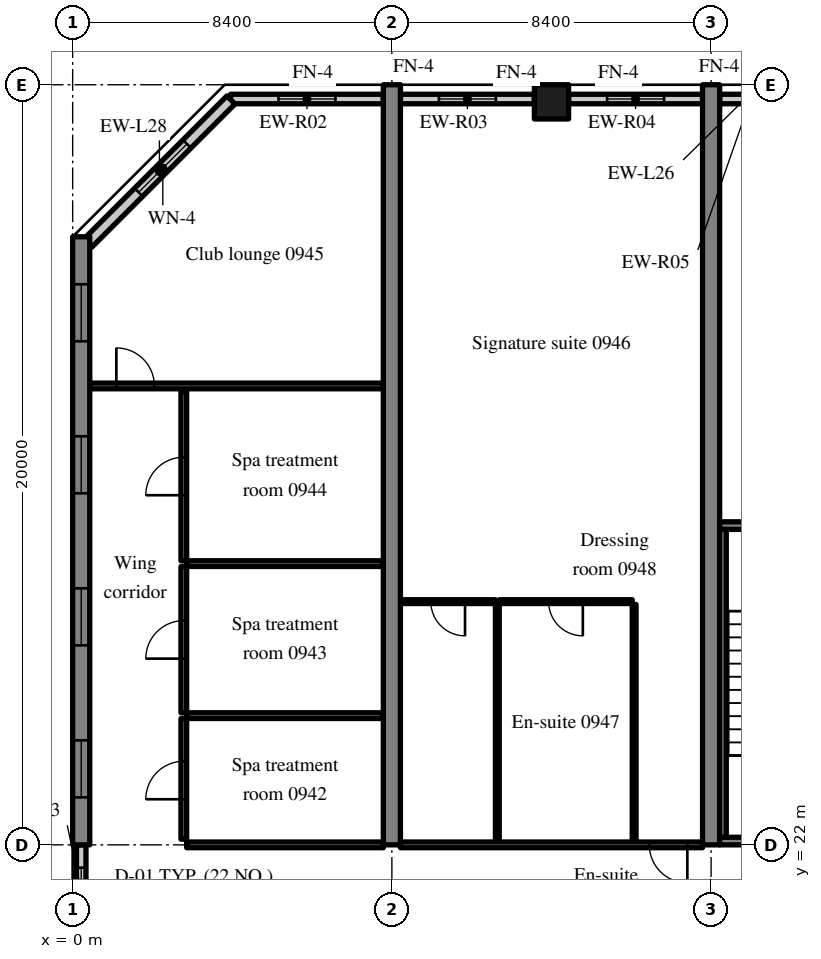
"""IFC4 building model, lengths in metres.
Left out: names, types, materials, properties, quantities, classifications, styles, units other than length and angle.
Written with IfcOpenShell. Run it as: python <this file> out.ifc"""

import sys

from ifc_helpers import new_model, si_unit, direction, frame, frame_2d, origin, origin_2d, place, context, subcontext, project, spatial, rectangle, extrude, source, transform, mapped, element, fill, save


model = new_model("IFC4")
c1 = context("Model", 3, precision=1e-05, world=origin(), true_north=direction((0.0, 1.0)))
c2 = subcontext(c1, "Body", "Model", "MODEL_VIEW")
j1 = project(units=[si_unit("LENGTHUNIT", "METRE"), si_unit("PLANEANGLEUNIT", "RADIAN")], contexts=[c1])
p1 = place(None, origin())
s1 = spatial("IfcSite", under=j1, at=p1, CompositionType="ELEMENT")
p2 = place(p1, origin())
s2 = spatial("IfcBuilding", under=s1, at=p2, CompositionType="ELEMENT")
p3 = place(p2, frame((0.0, 0.0, 43.0)))
s3 = spatial("IfcBuildingStorey", under=s2, at=p3, CompositionType="ELEMENT", Elevation=43.0)
m1 = source(origin(), c2, "Body", "SweptSolid", [
    extrude(rectangle(XDim=16.0, YDim=0.45, at=frame_2d((8.0, 0.0))), origin(), (0.0, 0.0, 1.0), 3.52),
])
p4 = place(p3, frame((0.225, 22.0, 0.0), z_axis=(0.0, 0.0, 1.0), x_axis=(0.0, 1.0, 0.0)))
e1 = element("IfcWall", 1, at=p4, inside=s3, PredefinedType="SHEAR", context=c2, shape_type="MappedRepresentation", body=[
    mapped(m1, transform((0.0, 0.0, 0.0), scale=1.0)),
])
m2 = source(origin(), c2, "Body", "SweptSolid", [
    extrude(rectangle(XDim=1.5, YDim=1.5, at=frame_2d((0.75, 0.75))), frame((0.0, 0.235, 0.0), z_axis=(0.0, -1.0, 0.0), x_axis=(1.0, 0.0, 0.0)), (0.0, 0.0, 1.0), 0.47),
])
p5 = place(p4, frame((1.25, 0.0, 0.9)))
e2 = element("IfcOpeningElement", 2, at=p5, cuts=e1, PredefinedType="OPENING", context=c2, shape_type="MappedRepresentation", body=[
    mapped(m2, transform((0.0, 0.0, 0.0), scale=1.0)),
])
p6 = place(p4, frame((5.25, 0.0, 0.9)))
e3 = element("IfcOpeningElement", 3, at=p6, cuts=e1, PredefinedType="OPENING", context=c2, shape_type="MappedRepresentation", body=[
    mapped(m2, transform((0.0, 0.0, 0.0), scale=1.0)),
])
p7 = place(p4, frame((9.25, 0.0, 0.9)))
e4 = element("IfcOpeningElement", 4, at=p7, cuts=e1, PredefinedType="OPENING", context=c2, shape_type="MappedRepresentation", body=[
    mapped(m2, transform((0.0, 0.0, 0.0), scale=1.0)),
])
p8 = place(p4, frame((13.25, 0.0, 0.9)))
e5 = element("IfcOpeningElement", 5, at=p8, cuts=e1, PredefinedType="OPENING", context=c2, shape_type="MappedRepresentation", body=[
    mapped(m2, transform((0.0, 0.0, 0.0), scale=1.0)),
])
m3 = source(origin(), c2, "Body", "SweptSolid", [
    extrude(rectangle(XDim=20.0, YDim=0.45, at=frame_2d((10.0, 0.0))), origin(), (0.0, 0.0, 1.0), 3.52),
])
for number, where, z_axis, x_axis in (
    (6, (8.4, 22.0, 0.0), (0.0, 0.0, 1.0), (0.0, 1.0, 0.0)),
    (7, (16.8, 22.0, 0.0), (0.0, 0.0, 1.0), (0.0, 1.0, 0.0)),
):
    element("IfcWall", number, at=place(p3, frame(where, z_axis=z_axis, x_axis=x_axis)), inside=s3, PredefinedType="SHEAR", context=c2, shape_type="MappedRepresentation", body=[
        mapped(m3, transform((0.0, 0.0, 0.0), scale=1.0)),
    ])
m4 = source(origin(), c2, "Body", "SweptSolid", [
    extrude(rectangle(XDim=0.9, YDim=0.9, at=origin_2d()), origin(), (0.0, 0.0, 1.0), 3.52),
])
p9 = place(p3, frame((12.6, 41.55, 0.0), z_axis=(0.0, 0.0, 1.0), x_axis=(1.0, 0.0, 0.0)))
e8 = element("IfcColumn", 8, at=p9, inside=s3, PredefinedType="COLUMN", context=c2, shape_type="MappedRepresentation", body=[
    mapped(m4, transform((0.0, 0.0, 0.0), scale=1.0)),
])
m5 = source(origin(), c2, "Body", "SweptSolid", [
    extrude(rectangle(XDim=4.02, YDim=0.25, at=frame_2d((2.01, 0.0))), origin(), (0.0, 0.0, 1.0), 2.82),
])
p10 = place(p3, frame((8.175, 41.625, 0.0), z_axis=(0.0, 0.0, 1.0), x_axis=(-1.0, 0.0, 0.0)))
e9 = element("IfcWall", 9, at=p10, inside=s3, PredefinedType="SOLIDWALL", context=c2, shape_type="MappedRepresentation", body=[
    mapped(m5, transform((0.0, 0.0, 0.0), scale=1.0)),
])
m6 = source(origin(), c2, "Body", "SweptSolid", [
    extrude(rectangle(XDim=1.5, YDim=1.5, at=frame_2d((0.75, 0.75))), frame((0.0, 0.135, 0.0), z_axis=(0.0, -1.0, 0.0), x_axis=(1.0, 0.0, 0.0)), (0.0, 0.0, 1.0), 0.27),
])
p11 = place(p10, frame((1.26, 0.0, 0.9)))
e10 = element("IfcOpeningElement", 10, at=p11, cuts=e9, PredefinedType="OPENING", context=c2, shape_type="MappedRepresentation", body=[
    mapped(m6, transform((0.0, 0.0, 0.0), scale=1.0)),
])
m7 = source(origin(), c2, "Body", "SweptSolid", [
    extrude(rectangle(XDim=3.525, YDim=0.25, at=frame_2d((1.762, 0.0))), origin(), (0.0, 0.0, 1.0), 2.82),
])
p12 = place(p3, frame((12.15, 41.625, 0.0), z_axis=(0.0, 0.0, 1.0), x_axis=(-1.0, 0.0, 0.0)))
e11 = element("IfcWall", 11, at=p12, inside=s3, PredefinedType="SOLIDWALL", context=c2, shape_type="MappedRepresentation", body=[
    mapped(m7, transform((0.0, 0.0, 0.0), scale=1.0)),
])
p13 = place(p12, frame((1.012, 0.0, 0.9)))
e12 = element("IfcOpeningElement", 12, at=p13, cuts=e11, PredefinedType="OPENING", context=c2, shape_type="MappedRepresentation", body=[
    mapped(m6, transform((0.0, 0.0, 0.0), scale=1.0)),
])
p14 = place(p3, frame((16.575, 41.625, 0.0), z_axis=(0.0, 0.0, 1.0), x_axis=(-1.0, 0.0, 0.0)))
e13 = element("IfcWall", 13, at=p14, inside=s3, PredefinedType="SOLIDWALL", context=c2, shape_type="MappedRepresentation", body=[
    mapped(m7, transform((0.0, 0.0, 0.0), scale=1.0)),
])
p15 = place(p14, frame((1.012, 0.0, 0.9)))
e14 = element("IfcOpeningElement", 14, at=p15, cuts=e13, PredefinedType="OPENING", context=c2, shape_type="MappedRepresentation", body=[
    mapped(m6, transform((0.0, 0.0, 0.0), scale=1.0)),
])
m8 = source(origin(), c2, "Body", "SweptSolid", [
    extrude(rectangle(XDim=1.633, YDim=0.25, at=frame_2d((0.816, 0.0))), origin(), (0.0, 0.0, 1.0), 2.82),
])
p16 = place(p3, frame((18.658, 41.625, 0.0), z_axis=(0.0, 0.0, 1.0), x_axis=(-1.0, 0.0, 0.0)))
e15 = element("IfcWall", 15, at=p16, inside=s3, PredefinedType="SOLIDWALL", context=c2, shape_type="MappedRepresentation", body=[
    mapped(m8, transform((0.0, 0.0, 0.0), scale=1.0)),
])
m9 = source(origin(), c2, "Body", "SweptSolid", [
    extrude(rectangle(XDim=5.326, YDim=0.3, at=frame_2d((2.663, 0.0))), origin(), (0.0, 0.0, 1.0), 3.52),
])
p17 = place(p3, frame((4.166, 41.6, 0.0), z_axis=(0.0, 0.0, 1.0), x_axis=(-0.707106781187, -0.707106781187, 0.0)))
e16 = element("IfcWall", 16, at=p17, inside=s3, PredefinedType="SOLIDWALL", context=c2, shape_type="MappedRepresentation", body=[
    mapped(m9, transform((0.0, 0.0, 0.0), scale=1.0)),
])
m10 = source(origin(), c2, "Body", "SweptSolid", [
    extrude(rectangle(XDim=1.8, YDim=1.5, at=frame_2d((0.9, 0.75))), frame((0.0, 0.16, 0.0), z_axis=(0.0, -1.0, 0.0), x_axis=(1.0, 0.0, 0.0)), (0.0, 0.0, 1.0), 0.32),
])
p18 = place(p17, frame((1.636, 0.0, 0.9)))
e17 = element("IfcOpeningElement", 17, at=p18, cuts=e16, PredefinedType="OPENING", context=c2, shape_type="MappedRepresentation", body=[
    mapped(m10, transform((0.0, 0.0, 0.0), scale=1.0)),
])
m11 = source(origin(), c2, "Body", "SweptSolid", [
    extrude(rectangle(XDim=2.4, YDim=0.25, at=frame_2d((1.2, 0.0))), origin(), (0.0, 0.0, 1.0), 2.62),
])
p19 = place(p3, frame((0.225, 19.6, 0.0), z_axis=(0.0, 0.0, 1.0), x_axis=(0.0, 1.0, 0.0)))
e18 = element("IfcWall", 18, at=p19, inside=s3, PredefinedType="SOLIDWALL", context=c2, shape_type="MappedRepresentation", body=[
    mapped(m11, transform((0.0, 0.0, 0.0), scale=1.0)),
])
m12 = source(origin(), c2, "Body", "SweptSolid", [
    extrude(rectangle(XDim=1.2, YDim=1.5, at=frame_2d((0.6, 0.75))), frame((0.0, 0.135, 0.0), z_axis=(0.0, -1.0, 0.0), x_axis=(1.0, 0.0, 0.0)), (0.0, 0.0, 1.0), 0.27),
])
p20 = place(p19, frame((0.6, 0.0, 0.9)))
e19 = element("IfcOpeningElement", 19, at=p20, cuts=e18, PredefinedType="OPENING", context=c2, shape_type="MappedRepresentation", body=[
    mapped(m12, transform((0.0, 0.0, 0.0), scale=1.0)),
])
m13 = source(origin(), c2, "Body", "SweptSolid", [
    extrude(rectangle(XDim=8.175, YDim=0.2, at=frame_2d((4.087, 0.0))), origin(), (0.0, 0.0, 1.0), 3.52),
])
p21 = place(p3, frame((17.025, 22.1, 0.0), z_axis=(0.0, 0.0, 1.0), x_axis=(1.0, 0.0, 0.0)))
e20 = element("IfcWall", 20, at=p21, inside=s3, PredefinedType="SOLIDWALL", context=c2, shape_type="MappedRepresentation", body=[
    mapped(m13, transform((0.0, 0.0, 0.0), scale=1.0)),
])
m14 = source(origin(), c2, "Body", "SweptSolid", [
    extrude(rectangle(XDim=1.2, YDim=2.1, at=frame_2d((0.6, 1.05))), frame((0.0, 0.11, 0.0), z_axis=(0.0, -1.0, 0.0), x_axis=(1.0, 0.0, 0.0)), (0.0, 0.0, 1.0), 0.22),
])
p22 = place(p21, frame((5.975, 0.0, 0.0)))
e21 = element("IfcOpeningElement", 21, at=p22, cuts=e20, PredefinedType="OPENING", context=c2, shape_type="MappedRepresentation", body=[
    mapped(m14, transform((0.0, 0.0, 0.0), scale=1.0)),
])
p23 = place(p3, frame((17.025, 30.4, 0.0), z_axis=(0.0, 0.0, 1.0), x_axis=(1.0, 0.0, 0.0)))
e22 = element("IfcWall", 22, at=p23, inside=s3, PredefinedType="SOLIDWALL", context=c2, shape_type="MappedRepresentation", body=[
    mapped(m13, transform((0.0, 0.0, 0.0), scale=1.0)),
])
m15 = source(origin(), c2, "Body", "SweptSolid", [
    extrude(rectangle(XDim=1.0, YDim=2.1, at=frame_2d((0.5, 1.05))), frame((0.0, 0.11, 0.0), z_axis=(0.0, -1.0, 0.0), x_axis=(1.0, 0.0, 0.0)), (0.0, 0.0, 1.0), 0.22),
])
p24 = place(p23, frame((6.075, 0.0, 0.0)))
e23 = element("IfcOpeningElement", 23, at=p24, cuts=e22, PredefinedType="OPENING", context=c2, shape_type="MappedRepresentation", body=[
    mapped(m15, transform((0.0, 0.0, 0.0), scale=1.0)),
])
m16 = source(origin(), c2, "Body", "SweptSolid", [
    extrude(rectangle(XDim=8.1, YDim=0.175, at=frame_2d((4.05, 0.0))), origin(), (0.0, 0.0, 1.0), 3.52),
])
p25 = place(p3, frame((17.112, 22.2, 0.0), z_axis=(0.0, 0.0, 1.0), x_axis=(0.0, 1.0, 0.0)))
e24 = element("IfcWall", 24, at=p25, inside=s3, PredefinedType="SOLIDWALL", context=c2, shape_type="MappedRepresentation", body=[
    mapped(m16, transform((0.0, 0.0, 0.0), scale=1.0)),
])
m17 = source(origin(), c2, "Body", "SweptSolid", [
    extrude(rectangle(XDim=5.175, YDim=0.15, at=frame_2d((2.587, 0.0))), origin(), (0.0, 0.0, 1.0), 2.82),
])
p26 = place(p3, frame((3.0, 22.0, 0.0), z_axis=(0.0, 0.0, 1.0), x_axis=(1.0, 0.0, 0.0)))
e25 = element("IfcWall", 25, at=p26, inside=s3, PredefinedType="PARTITIONING", context=c2, shape_type="MappedRepresentation", body=[
    mapped(m17, transform((0.0, 0.0, 0.0), scale=1.0)),
])
m18 = source(origin(), c2, "Body", "SweptSolid", [
    extrude(rectangle(XDim=3.175, YDim=0.15, at=frame_2d((1.587, 0.0))), origin(), (0.0, 0.0, 1.0), 3.52),
])
p27 = place(p3, frame((2.925, 22.15, 0.0), z_axis=(0.0, 0.0, 1.0), x_axis=(0.0, 1.0, 0.0)))
e26 = element("IfcWall", 26, at=p27, inside=s3, PredefinedType="PARTITIONING", context=c2, shape_type="MappedRepresentation", body=[
    mapped(m18, transform((0.0, 0.0, 0.0), scale=1.0)),
])
m19 = source(origin(), c2, "Body", "SweptSolid", [
    extrude(rectangle(XDim=1.0, YDim=2.1, at=frame_2d((0.5, 1.05))), frame((0.0, 0.085, 0.0), z_axis=(0.0, -1.0, 0.0), x_axis=(1.0, 0.0, 0.0)), (0.0, 0.0, 1.0), 0.17),
])
p28 = place(p27, frame((1.05, 0.0, 0.0)))
e27 = element("IfcOpeningElement", 27, at=p28, cuts=e26, PredefinedType="OPENING", context=c2, shape_type="MappedRepresentation", body=[
    mapped(m19, transform((0.0, 0.0, 0.0), scale=1.0)),
])
m20 = source(origin(), c2, "Body", "SweptSolid", [
    extrude(rectangle(XDim=5.175, YDim=0.15, at=frame_2d((2.587, 0.0))), origin(), (0.0, 0.0, 1.0), 3.52),
])
p29 = place(p3, frame((3.0, 25.4, 0.0), z_axis=(0.0, 0.0, 1.0), x_axis=(1.0, 0.0, 0.0)))
e28 = element("IfcWall", 28, at=p29, inside=s3, PredefinedType="PARTITIONING", context=c2, shape_type="MappedRepresentation", body=[
    mapped(m20, transform((0.0, 0.0, 0.0), scale=1.0)),
])
m21 = source(origin(), c2, "Body", "SweptSolid", [
    extrude(rectangle(XDim=3.85, YDim=0.15, at=frame_2d((1.925, 0.0))), origin(), (0.0, 0.0, 1.0), 3.52),
])
p30 = place(p3, frame((2.925, 25.475, 0.0), z_axis=(0.0, 0.0, 1.0), x_axis=(0.0, 1.0, 0.0)))
e29 = element("IfcWall", 29, at=p30, inside=s3, PredefinedType="PARTITIONING", context=c2, shape_type="MappedRepresentation", body=[
    mapped(m21, transform((0.0, 0.0, 0.0), scale=1.0)),
])
p31 = place(p30, frame((1.425, 0.0, 0.0)))
e30 = element("IfcOpeningElement", 30, at=p31, cuts=e29, PredefinedType="OPENING", context=c2, shape_type="MappedRepresentation", body=[
    mapped(m19, transform((0.0, 0.0, 0.0), scale=1.0)),
])
p32 = place(p3, frame((3.0, 29.4, 0.0), z_axis=(0.0, 0.0, 1.0), x_axis=(1.0, 0.0, 0.0)))
e31 = element("IfcWall", 31, at=p32, inside=s3, PredefinedType="PARTITIONING", context=c2, shape_type="MappedRepresentation", body=[
    mapped(m20, transform((0.0, 0.0, 0.0), scale=1.0)),
])
m22 = source(origin(), c2, "Body", "SweptSolid", [
    extrude(rectangle(XDim=4.45, YDim=0.15, at=frame_2d((2.225, 0.0))), origin(), (0.0, 0.0, 1.0), 3.52),
])
p33 = place(p3, frame((2.925, 29.475, 0.0), z_axis=(0.0, 0.0, 1.0), x_axis=(0.0, 1.0, 0.0)))
e32 = element("IfcWall", 32, at=p33, inside=s3, PredefinedType="PARTITIONING", context=c2, shape_type="MappedRepresentation", body=[
    mapped(m22, transform((0.0, 0.0, 0.0), scale=1.0)),
])
p34 = place(p33, frame((1.725, 0.0, 0.0)))
e33 = element("IfcOpeningElement", 33, at=p34, cuts=e32, PredefinedType="OPENING", context=c2, shape_type="MappedRepresentation", body=[
    mapped(m19, transform((0.0, 0.0, 0.0), scale=1.0)),
])
m23 = source(origin(), c2, "Body", "SweptSolid", [
    extrude(rectangle(XDim=7.725, YDim=0.15, at=frame_2d((3.863, 0.0))), origin(), (0.0, 0.0, 1.0), 3.52),
])
p35 = place(p3, frame((0.45, 34.075, 0.0), z_axis=(0.0, 0.0, 1.0), x_axis=(1.0, 0.0, 0.0)))
e34 = element("IfcWall", 34, at=p35, inside=s3, PredefinedType="PARTITIONING", context=c2, shape_type="MappedRepresentation", body=[
    mapped(m23, transform((0.0, 0.0, 0.0), scale=1.0)),
])
p36 = place(p35, frame((0.7, 0.0, 0.0)))
e35 = element("IfcOpeningElement", 35, at=p36, cuts=e34, PredefinedType="OPENING", context=c2, shape_type="MappedRepresentation", body=[
    mapped(m19, transform((0.0, 0.0, 0.0), scale=1.0)),
])
m24 = source(origin(), c2, "Body", "SweptSolid", [
    extrude(rectangle(XDim=6.25, YDim=0.1, at=frame_2d((3.125, 0.0))), origin(), (0.0, 0.0, 1.0), 3.52),
])
for number, where, z_axis, x_axis in (
    (36, (14.775, 22.075, 0.0), (0.0, 0.0, 1.0), (0.0, 1.0, 0.0)),
    (37, (11.175, 22.075, 0.0), (0.0, 0.0, 1.0), (0.0, 1.0, 0.0)),
):
    element("IfcWall", number, at=place(p3, frame(where, z_axis=z_axis, x_axis=x_axis)), inside=s3, PredefinedType="PARTITIONING", context=c2, shape_type="MappedRepresentation", body=[
        mapped(m24, transform((0.0, 0.0, 0.0), scale=1.0)),
    ])
m25 = source(origin(), c2, "Body", "SweptSolid", [
    extrude(rectangle(XDim=3.5, YDim=0.1, at=frame_2d((1.75, 0.0))), origin(), (0.0, 0.0, 1.0), 3.52),
])
p37 = place(p3, frame((11.225, 28.4, 0.0), z_axis=(0.0, 0.0, 1.0), x_axis=(1.0, 0.0, 0.0)))
e38 = element("IfcWall", 38, at=p37, inside=s3, PredefinedType="PARTITIONING", context=c2, shape_type="MappedRepresentation", body=[
    mapped(m25, transform((0.0, 0.0, 0.0), scale=1.0)),
])
m26 = source(origin(), c2, "Body", "SweptSolid", [
    extrude(rectangle(XDim=0.9, YDim=2.1, at=frame_2d((0.45, 1.05))), frame((0.0, 0.06, 0.0), z_axis=(0.0, -1.0, 0.0), x_axis=(1.0, 0.0, 0.0)), (0.0, 0.0, 1.0), 0.12),
])
p38 = place(p37, frame((1.3, 0.0, 0.0)))
e39 = element("IfcOpeningElement", 39, at=p38, cuts=e38, PredefinedType="OPENING", context=c2, shape_type="MappedRepresentation", body=[
    mapped(m26, transform((0.0, 0.0, 0.0), scale=1.0)),
])
m27 = source(origin(), c2, "Body", "SweptSolid", [
    extrude(rectangle(XDim=2.5, YDim=0.1, at=frame_2d((1.25, 0.0))), origin(), (0.0, 0.0, 1.0), 3.52),
])
p39 = place(p3, frame((8.625, 28.4, 0.0), z_axis=(0.0, 0.0, 1.0), x_axis=(1.0, 0.0, 0.0)))
e40 = element("IfcWall", 40, at=p39, inside=s3, PredefinedType="PARTITIONING", context=c2, shape_type="MappedRepresentation", body=[
    mapped(m27, transform((0.0, 0.0, 0.0), scale=1.0)),
])
p40 = place(p39, frame((0.8, 0.0, 0.0)))
e41 = element("IfcOpeningElement", 41, at=p40, cuts=e40, PredefinedType="OPENING", context=c2, shape_type="MappedRepresentation", body=[
    mapped(m26, transform((0.0, 0.0, 0.0), scale=1.0)),
])
m28 = source(origin(), c2, "Body", "SweptSolid", [
    extrude(rectangle(XDim=7.95, YDim=0.15, at=frame_2d((3.975, 0.0))), origin(), (0.0, 0.0, 1.0), 2.82),
])
p41 = place(p3, frame((8.625, 22.0, 0.0), z_axis=(0.0, 0.0, 1.0), x_axis=(1.0, 0.0, 0.0)))
e42 = element("IfcWall", 42, at=p41, inside=s3, PredefinedType="PARTITIONING", context=c2, shape_type="MappedRepresentation", body=[
    mapped(m28, transform((0.0, 0.0, 0.0), scale=1.0)),
])
p42 = place(p41, frame((6.55, 0.0, 0.0)))
e43 = element("IfcOpeningElement", 43, at=p42, cuts=e42, PredefinedType="OPENING", context=c2, shape_type="MappedRepresentation", body=[
    mapped(m19, transform((0.0, 0.0, 0.0), scale=1.0)),
])
m29 = source(origin(), c2, "Body", "SweptSolid", [
    extrude(rectangle(XDim=1.5, YDim=1.5, at=frame_2d((0.75, 0.75))), frame((0.0, 0.03, 0.0), z_axis=(0.0, -1.0, 0.0), x_axis=(1.0, 0.0, 0.0)), (0.0, 0.0, 1.0), 0.06),
])
p43 = place(p11, origin())
e44 = element("IfcWindow", 44, at=p43, inside=s3, PartitioningType="SINGLE_PANEL", PredefinedType="WINDOW", context=c2, shape_type="MappedRepresentation", body=[
    mapped(m29, transform((0.0, 0.0, 0.0), scale=1.0)),
])
fill(e10, e44)
p44 = place(p13, origin())
e45 = element("IfcWindow", 45, at=p44, inside=s3, PartitioningType="SINGLE_PANEL", PredefinedType="WINDOW", context=c2, shape_type="MappedRepresentation", body=[
    mapped(m29, transform((0.0, 0.0, 0.0), scale=1.0)),
])
fill(e12, e45)
p45 = place(p15, origin())
e46 = element("IfcWindow", 46, at=p45, inside=s3, PartitioningType="SINGLE_PANEL", PredefinedType="WINDOW", context=c2, shape_type="MappedRepresentation", body=[
    mapped(m29, transform((0.0, 0.0, 0.0), scale=1.0)),
])
fill(e14, e46)
m30 = source(origin(), c2, "Body", "SweptSolid", [
    extrude(rectangle(XDim=1.8, YDim=1.5, at=frame_2d((0.9, 0.75))), frame((0.0, 0.03, 0.0), z_axis=(0.0, -1.0, 0.0), x_axis=(1.0, 0.0, 0.0)), (0.0, 0.0, 1.0), 0.06),
])
p46 = place(p18, origin())
e47 = element("IfcWindow", 47, at=p46, inside=s3, PartitioningType="SINGLE_PANEL", PredefinedType="WINDOW", context=c2, shape_type="MappedRepresentation", body=[
    mapped(m30, transform((0.0, 0.0, 0.0), scale=1.0)),
])
fill(e17, e47)
p47 = place(p5, origin())
e48 = element("IfcWindow", 48, at=p47, inside=s3, PartitioningType="SINGLE_PANEL", PredefinedType="WINDOW", context=c2, shape_type="MappedRepresentation", body=[
    mapped(m29, transform((0.0, 0.0, 0.0), scale=1.0)),
])
fill(e2, e48)
p48 = place(p6, origin())
e49 = element("IfcWindow", 49, at=p48, inside=s3, PartitioningType="SINGLE_PANEL", PredefinedType="WINDOW", context=c2, shape_type="MappedRepresentation", body=[
    mapped(m29, transform((0.0, 0.0, 0.0), scale=1.0)),
])
fill(e3, e49)
p49 = place(p7, origin())
e50 = element("IfcWindow", 50, at=p49, inside=s3, PartitioningType="SINGLE_PANEL", PredefinedType="WINDOW", context=c2, shape_type="MappedRepresentation", body=[
    mapped(m29, transform((0.0, 0.0, 0.0), scale=1.0)),
])
fill(e4, e50)
p50 = place(p8, origin())
e51 = element("IfcWindow", 51, at=p50, inside=s3, PartitioningType="SINGLE_PANEL", PredefinedType="WINDOW", context=c2, shape_type="MappedRepresentation", body=[
    mapped(m29, transform((0.0, 0.0, 0.0), scale=1.0)),
])
fill(e5, e51)
m31 = source(origin(), c2, "Body", "SweptSolid", [
    extrude(rectangle(XDim=1.2, YDim=1.5, at=frame_2d((0.6, 0.75))), frame((0.0, 0.03, 0.0), z_axis=(0.0, -1.0, 0.0), x_axis=(1.0, 0.0, 0.0)), (0.0, 0.0, 1.0), 0.06),
])
p51 = place(p20, origin())
e52 = element("IfcWindow", 52, at=p51, inside=s3, PartitioningType="SINGLE_PANEL", PredefinedType="WINDOW", context=c2, shape_type="MappedRepresentation", body=[
    mapped(m31, transform((0.0, 0.0, 0.0), scale=1.0)),
])
fill(e19, e52)
m32 = source(origin(), c2, "Body", "SweptSolid", [
    extrude(rectangle(XDim=1.0, YDim=2.1, at=frame_2d((0.5, 1.05))), frame((0.0, 0.025, 0.0), z_axis=(0.0, -1.0, 0.0), x_axis=(1.0, 0.0, 0.0)), (0.0, 0.0, 1.0), 0.05),
])
p52 = place(p28, origin())
e53 = element("IfcDoor", 53, at=p52, inside=s3, OperationType="SINGLE_SWING_LEFT", PredefinedType="DOOR", context=c2, shape_type="MappedRepresentation", body=[
    mapped(m32, transform((0.0, 0.0, 0.0), scale=1.0)),
])
fill(e27, e53)
p53 = place(p31, origin())
e54 = element("IfcDoor", 54, at=p53, inside=s3, OperationType="SINGLE_SWING_LEFT", PredefinedType="DOOR", context=c2, shape_type="MappedRepresentation", body=[
    mapped(m32, transform((0.0, 0.0, 0.0), scale=1.0)),
])
fill(e30, e54)
p54 = place(p34, origin())
e55 = element("IfcDoor", 55, at=p54, inside=s3, OperationType="SINGLE_SWING_LEFT", PredefinedType="DOOR", context=c2, shape_type="MappedRepresentation", body=[
    mapped(m32, transform((0.0, 0.0, 0.0), scale=1.0)),
])
fill(e33, e55)
p55 = place(p36, origin())
e56 = element("IfcDoor", 56, at=p55, inside=s3, OperationType="SINGLE_SWING_LEFT", PredefinedType="DOOR", context=c2, shape_type="MappedRepresentation", body=[
    mapped(m32, transform((0.0, 0.0, 0.0), scale=1.0)),
])
fill(e35, e56)
m33 = source(origin(), c2, "Body", "SweptSolid", [
    extrude(rectangle(XDim=0.9, YDim=2.1, at=frame_2d((0.45, 1.05))), frame((0.0, 0.025, 0.0), z_axis=(0.0, -1.0, 0.0), x_axis=(1.0, 0.0, 0.0)), (0.0, 0.0, 1.0), 0.05),
])
p56 = place(p38, origin())
e57 = element("IfcDoor", 57, at=p56, inside=s3, OperationType="SINGLE_SWING_RIGHT", PredefinedType="DOOR", context=c2, shape_type="MappedRepresentation", body=[
    mapped(m33, transform((0.0, 0.0, 0.0), scale=1.0)),
])
fill(e39, e57)
p57 = place(p40, origin())
e58 = element("IfcDoor", 58, at=p57, inside=s3, OperationType="SINGLE_SWING_RIGHT", PredefinedType="DOOR", context=c2, shape_type="MappedRepresentation", body=[
    mapped(m33, transform((0.0, 0.0, 0.0), scale=1.0)),
])
fill(e41, e58)
p58 = place(p42, origin())
e59 = element("IfcDoor", 59, at=p58, inside=s3, OperationType="SINGLE_SWING_RIGHT", PredefinedType="DOOR", context=c2, shape_type="MappedRepresentation", body=[
    mapped(m32, transform((0.0, 0.0, 0.0), scale=1.0)),
])
fill(e43, e59)
save(model, sys.argv[1])
